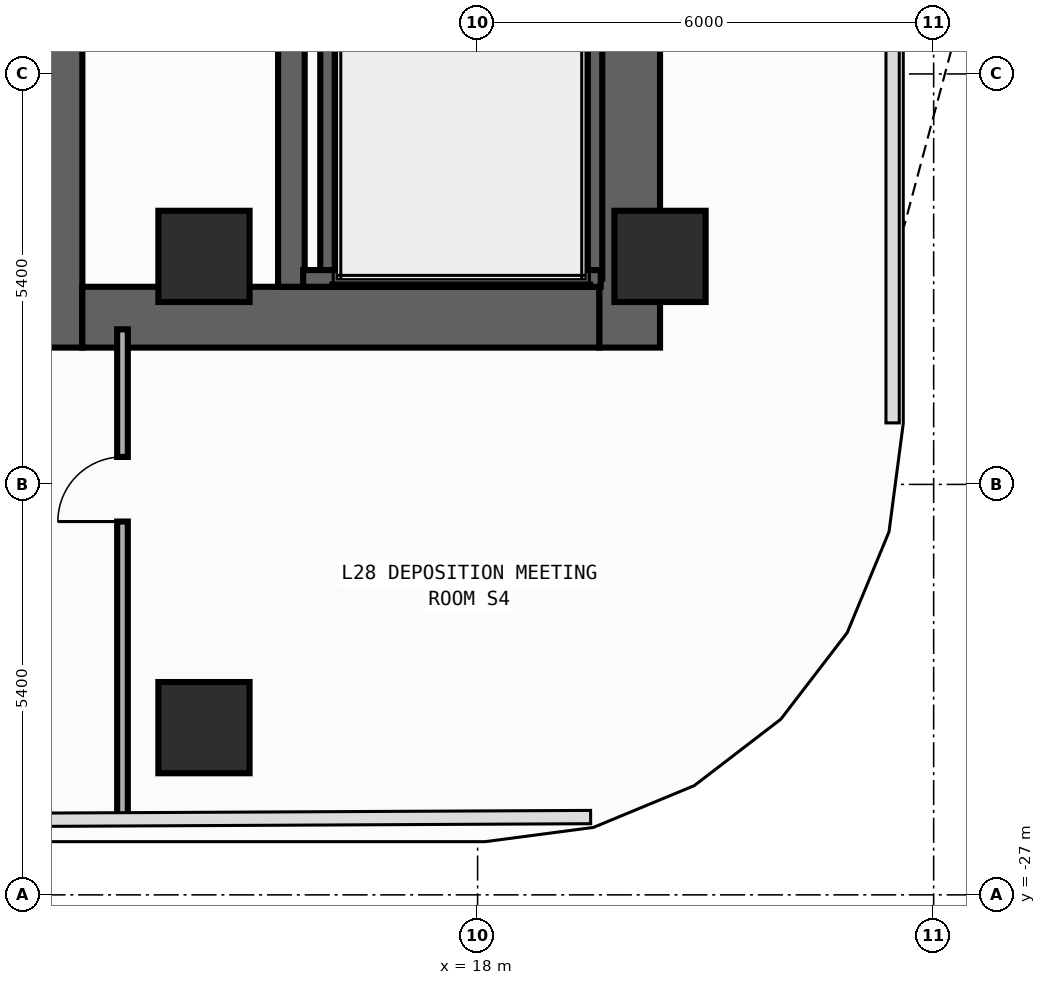
"""IFC4 building model, lengths in metres.
Left out: names, types, materials, properties, quantities, classifications, styles, units other than length and angle.
Written with IfcOpenShell. Run it as: python <this file> out.ifc"""

import sys

from ifc_helpers import new_model, si_unit, direction, frame, frame_2d, origin, origin_2d, place, context, subcontext, project, spatial, rectangle, extrude, element, fill, save


model = new_model("IFC4")
c1 = context("Model", 3, precision=1e-05, world=origin(), true_north=direction((0.0, 1.0)))
c2 = subcontext(c1, "Body", "Model", "MODEL_VIEW")
j1 = project(units=[si_unit("LENGTHUNIT", "METRE"), si_unit("PLANEANGLEUNIT", "RADIAN")], contexts=[c1])
p1 = place(None, origin())
s1 = spatial("IfcSite", under=j1, at=p1, CompositionType="ELEMENT")
p2 = place(p1, origin())
s2 = spatial("IfcBuilding", under=s1, at=p2, CompositionType="ELEMENT")
p3 = place(p2, frame((0.0, 0.0, 122.6)))
s3 = spatial("IfcBuildingStorey", under=s2, at=p3, CompositionType="ELEMENT", Elevation=122.6)
p4 = place(p3, frame((12.4, -19.8, 0.0), z_axis=(0.0, 0.0, 1.0), x_axis=(0.0, 1.0, 0.0)))
e1 = element("IfcWall", 1, at=p4, inside=s3, PredefinedType="SHEAR", context=c2, shape_type="SweptSolid", body=[
    extrude(rectangle(XDim=27.0, YDim=0.8, at=frame_2d((13.5, 0.0))), origin(), (0.0, 0.0, 1.0), 3.94),
])
p5 = place(p4, frame((23.05, 0.0, 0.0)))
e2 = element("IfcOpeningElement", 2, at=p5, cuts=e1, PredefinedType="OPENING", context=c2, shape_type="SweptSolid", body=[
    extrude(rectangle(XDim=1.1, YDim=2.2, at=frame_2d((0.55, 1.1))), frame((0.0, 0.41, 0.0), z_axis=(0.0, -1.0, 0.0), x_axis=(1.0, 0.0, 0.0)), (0.0, 0.0, 1.0), 0.82),
])
p6 = place(p4, frame((19.85, 0.0, 0.0)))
e3 = element("IfcOpeningElement", 3, at=p6, cuts=e1, PredefinedType="OPENING", context=c2, shape_type="SweptSolid", body=[
    extrude(rectangle(XDim=1.1, YDim=2.2, at=frame_2d((0.55, 1.1))), frame((0.0, 0.41, 0.0), z_axis=(0.0, -1.0, 0.0), x_axis=(1.0, 0.0, 0.0)), (0.0, 0.0, 1.0), 0.82),
])
p7 = place(p4, frame((16.65, 0.0, 0.0)))
e4 = element("IfcOpeningElement", 4, at=p7, cuts=e1, PredefinedType="OPENING", context=c2, shape_type="SweptSolid", body=[
    extrude(rectangle(XDim=1.1, YDim=2.2, at=frame_2d((0.55, 1.1))), frame((0.0, 0.41, 0.0), z_axis=(0.0, -1.0, 0.0), x_axis=(1.0, 0.0, 0.0)), (0.0, 0.0, 1.0), 0.82),
])
p8 = place(p4, frame((7.175, 0.0, 0.0)))
e5 = element("IfcOpeningElement", 5, at=p8, cuts=e1, PredefinedType="OPENING", context=c2, shape_type="SweptSolid", body=[
    extrude(rectangle(XDim=0.85, YDim=2.1, at=frame_2d((0.425, 1.05))), frame((0.0, 0.41, 0.0), z_axis=(0.0, -1.0, 0.0), x_axis=(1.0, 0.0, 0.0)), (0.0, 0.0, 1.0), 0.82),
])
p9 = place(p4, frame((10.375, 0.0, 0.0)))
e6 = element("IfcOpeningElement", 6, at=p9, cuts=e1, PredefinedType="OPENING", context=c2, shape_type="SweptSolid", body=[
    extrude(rectangle(XDim=0.85, YDim=2.1, at=frame_2d((0.425, 1.05))), frame((0.0, 0.41, 0.0), z_axis=(0.0, -1.0, 0.0), x_axis=(1.0, 0.0, 0.0)), (0.0, 0.0, 1.0), 0.82),
])
p10 = place(p4, frame((12.725, 0.0, 0.0)))
e7 = element("IfcOpeningElement", 7, at=p10, cuts=e1, PredefinedType="OPENING", context=c2, shape_type="SweptSolid", body=[
    extrude(rectangle(XDim=1.15, YDim=2.2, at=frame_2d((0.575, 1.1))), frame((0.0, 0.41, 0.0), z_axis=(0.0, -1.0, 0.0), x_axis=(1.0, 0.0, 0.0)), (0.0, 0.0, 1.0), 0.82),
])
p11 = place(p4, frame((25.125, 0.0, 0.0)))
e8 = element("IfcOpeningElement", 8, at=p11, cuts=e1, PredefinedType="OPENING", context=c2, shape_type="SweptSolid", body=[
    extrude(rectangle(XDim=0.85, YDim=2.1, at=frame_2d((0.425, 1.05))), frame((0.0, 0.41, 0.0), z_axis=(0.0, -1.0, 0.0), x_axis=(1.0, 0.0, 0.0)), (0.0, 0.0, 1.0), 0.82),
])
p12 = place(p3, frame((20.0, -19.8, 0.0), z_axis=(0.0, 0.0, 1.0), x_axis=(0.0, 1.0, 0.0)))
e9 = element("IfcWall", 9, at=p12, inside=s3, PredefinedType="SHEAR", context=c2, shape_type="SweptSolid", body=[
    extrude(rectangle(XDim=27.0, YDim=0.8, at=frame_2d((13.5, 0.0))), origin(), (0.0, 0.0, 1.0), 3.94),
])
p13 = place(p3, frame((12.8, -19.4, 0.0), z_axis=(0.0, 0.0, 1.0), x_axis=(1.0, 0.0, 0.0)))
e10 = element("IfcWall", 10, at=p13, inside=s3, PredefinedType="SHEAR", context=c2, shape_type="SweptSolid", body=[
    extrude(rectangle(XDim=6.8, YDim=0.8, at=frame_2d((3.4, 0.0))), origin(), (0.0, 0.0, 1.0), 3.94),
])
p14 = place(p3, frame((15.55, -19.0, 0.0), z_axis=(0.0, 0.0, 1.0), x_axis=(0.0, 1.0, 0.0)))
e11 = element("IfcWall", 11, at=p14, inside=s3, PredefinedType="SHEAR", context=c2, shape_type="SweptSolid", body=[
    extrude(rectangle(XDim=25.4, YDim=0.35, at=frame_2d((12.7, 0.0))), origin(), (0.0, 0.0, 1.0), 3.94),
])
p15 = place(p14, frame((11.925, 0.0, 0.0)))
e12 = element("IfcOpeningElement", 12, at=p15, cuts=e11, PredefinedType="OPENING", context=c2, shape_type="SweptSolid", body=[
    extrude(rectangle(XDim=1.15, YDim=2.2, at=frame_2d((0.575, 1.1))), frame((0.0, 0.185, 0.0), z_axis=(0.0, -1.0, 0.0), x_axis=(1.0, 0.0, 0.0)), (0.0, 0.0, 1.0), 0.37),
])
p16 = place(p14, frame((24.325, 0.0, 0.0)))
e13 = element("IfcOpeningElement", 13, at=p16, cuts=e11, PredefinedType="OPENING", context=c2, shape_type="SweptSolid", body=[
    extrude(rectangle(XDim=0.85, YDim=2.1, at=frame_2d((0.425, 1.05))), frame((0.0, 0.185, 0.0), z_axis=(0.0, -1.0, 0.0), x_axis=(1.0, 0.0, 0.0)), (0.0, 0.0, 1.0), 0.37),
])
for number, where, z_axis, x_axis in (
    (14, (16.04, -18.89, 0.0), (0.0, 0.0, 1.0), (0.0, 1.0, 0.0)),
    (15, (19.53, -18.89, 0.0), (0.0, 0.0, 1.0), (0.0, 1.0, 0.0)),
):
    element("IfcWall", number, at=place(p3, frame(where, z_axis=z_axis, x_axis=x_axis)), inside=s3, PredefinedType="SHEAR", context=c2, shape_type="SweptSolid", body=[
        extrude(rectangle(XDim=11.3, YDim=0.22, at=frame_2d((5.65, 0.0))), origin(), (0.0, 0.0, 1.0), 3.94),
    ])
p17 = place(p3, frame((15.705, -18.89, 0.0), z_axis=(0.0, 0.0, 1.0), x_axis=(1.0, 0.0, 0.0)))
e16 = element("IfcWall", 16, at=p17, inside=s3, PredefinedType="SHEAR", context=c2, shape_type="SweptSolid", body=[
    extrude(rectangle(XDim=3.915, YDim=0.22, at=frame_2d((1.958, 0.0))), origin(), (0.0, 0.0, 1.0), 3.94),
])
for number, where, z_axis, x_axis in (
    (17, (20.4, -18.6, 0.0), (0.0, 0.0, 1.0), (1.0, 0.0, 0.0)),
    (18, (14.4, -18.6, 0.0), (0.0, 0.0, 1.0), (1.0, 0.0, 0.0)),
    (19, (14.4, -24.8, 0.0), (0.0, 0.0, 1.0), (1.0, 0.0, 0.0)),
):
    element("IfcColumn", number, at=place(p3, frame(where, z_axis=z_axis, x_axis=x_axis)), inside=s3, PredefinedType="COLUMN", context=c2, shape_type="SweptSolid", body=[
        extrude(rectangle(XDim=1.2, YDim=1.2, at=origin_2d()), origin(), (0.0, 0.0, 1.0), 4.2),
    ])
p18 = place(p3, frame((13.328, -26.001, 0.0), z_axis=(0.0, 0.0, 1.0), x_axis=(0.0, 1.0, 0.0)))
e20 = element("IfcWall", 20, at=p18, inside=s3, PredefinedType="PARTITIONING", context=c2, shape_type="SweptSolid", body=[
    extrude(rectangle(XDim=6.441, YDim=0.14, at=frame_2d((3.221, 0.0))), origin(), (0.0, 0.0, 1.0), 3.94),
])
p19 = place(p18, frame((3.913, 0.0, 0.0)))
e21 = element("IfcOpeningElement", 21, at=p19, cuts=e20, PredefinedType="OPENING", context=c2, shape_type="SweptSolid", body=[
    extrude(rectangle(XDim=0.85, YDim=2.1, at=frame_2d((0.425, 1.05))), frame((0.0, 0.08, 0.0), z_axis=(0.0, -1.0, 0.0), x_axis=(1.0, 0.0, 0.0)), (0.0, 0.0, 1.0), 0.16),
])
p20 = place(p19, origin())
e22 = element("IfcDoor", 22, at=p20, inside=s3, OperationType="SINGLE_SWING_LEFT", PredefinedType="DOOR", context=c2, shape_type="SweptSolid", body=[
    extrude(rectangle(XDim=0.85, YDim=2.1, at=frame_2d((0.425, 1.05))), frame((0.0, 0.025, 0.0), z_axis=(0.0, -1.0, 0.0), x_axis=(1.0, 0.0, 0.0)), (0.0, 0.0, 1.0), 0.05),
])
fill(e21, e22)
save(model, sys.argv[1])
